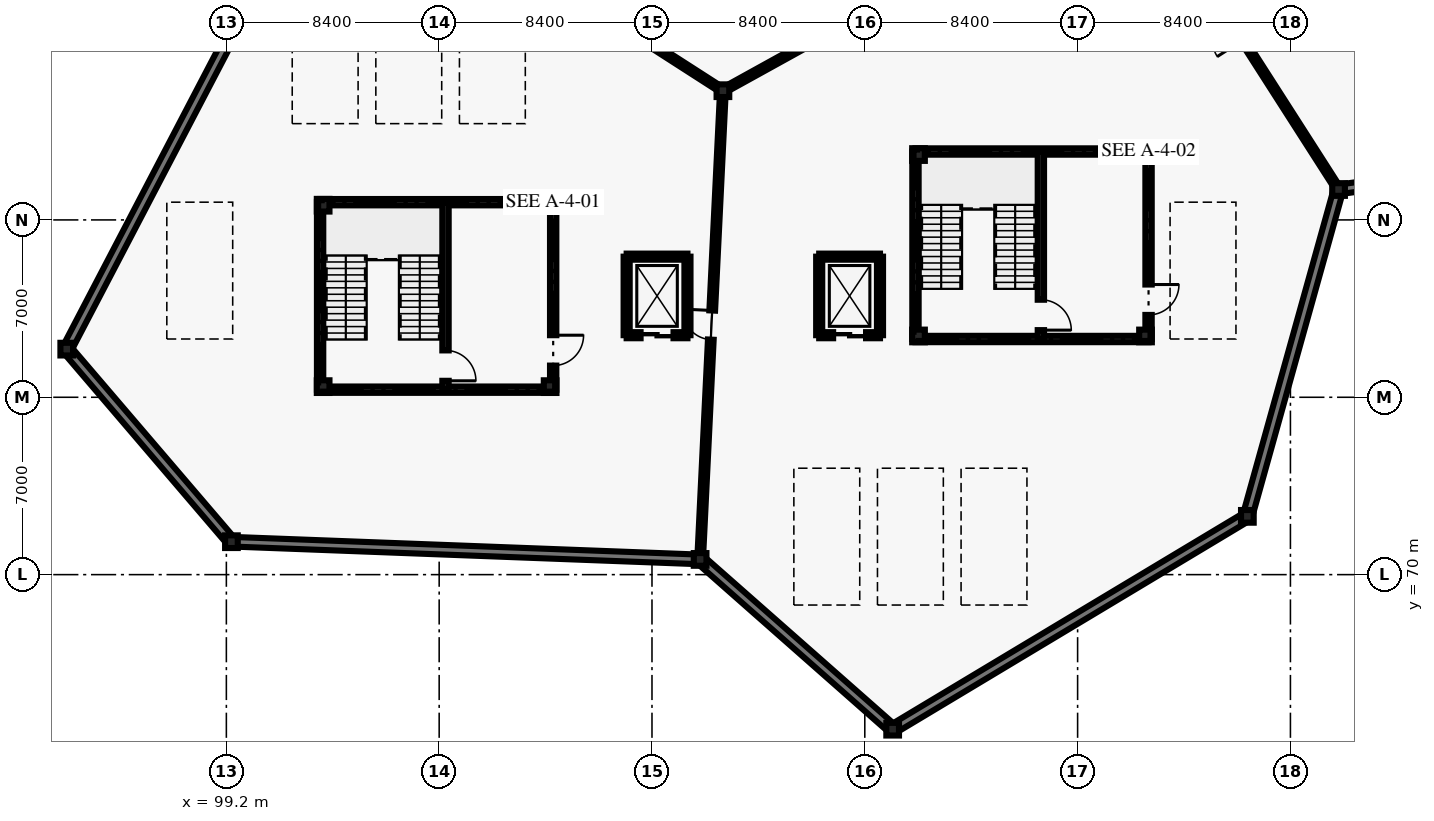
"""IFC4 building model, lengths in metres.
Left out: names, types, materials, properties, quantities, classifications, styles, units other than length and angle.
Written with IfcOpenShell. Run it as: python <this file> out.ifc"""

import sys

from ifc_helpers import new_model, si_unit, direction, frame, frame_2d, origin, origin_2d, place, context, subcontext, project, spatial, rectangle, i_section, extrude, element, fill, save


model = new_model("IFC4")
c1 = context("Model", 3, precision=1e-05, world=origin(), true_north=direction((0.0, 1.0)))
c2 = subcontext(c1, "Body", "Model", "MODEL_VIEW")
j1 = project(units=[si_unit("LENGTHUNIT", "METRE"), si_unit("PLANEANGLEUNIT", "RADIAN")], contexts=[c1])
p1 = place(None, origin())
s1 = spatial("IfcSite", under=j1, at=p1, CompositionType="ELEMENT")
p2 = place(p1, origin())
s2 = spatial("IfcBuilding", under=s1, at=p2, CompositionType="ELEMENT")
p3 = place(p2, frame((0.0, 0.0, -4.5)))
s3 = spatial("IfcBuildingStorey", under=s2, at=p3, CompositionType="ELEMENT", Elevation=-4.5)
for number, where, z_axis, x_axis in (
    (1, (92.9, 78.9, 0.0), (0.0, 0.0, 1.0), (1.0, 0.0, 0.0)),
    (2, (99.4, 71.3, 0.0), (0.0, 0.0, 1.0), (1.0, 0.0, 0.0)),
    (3, (117.9, 70.6, 0.0), (0.0, 0.0, 1.0), (1.0, 0.0, 0.0)),
    (4, (118.8, 89.1, 0.0), (0.0, 0.0, 1.0), (1.0, 0.0, 0.0)),
    (5, (125.5, 63.9, 0.0), (0.0, 0.0, 1.0), (1.0, 0.0, 0.0)),
    (6, (139.5, 72.3, 0.0), (0.0, 0.0, 1.0), (1.0, 0.0, 0.0)),
    (7, (143.1, 85.2, 0.0), (0.0, 0.0, 1.0), (1.0, 0.0, 0.0)),
    (8, (103.02, 77.42, 0.0), (0.0, 0.0, 1.0), (1.0, 0.0, 0.0)),
    (9, (111.98, 77.42, 0.0), (0.0, 0.0, 1.0), (1.0, 0.0, 0.0)),
    (10, (111.98, 84.58, 0.0), (0.0, 0.0, 1.0), (1.0, 0.0, 0.0)),
    (11, (103.02, 84.58, 0.0), (0.0, 0.0, 1.0), (1.0, 0.0, 0.0)),
    (12, (126.52, 79.42, 0.0), (0.0, 0.0, 1.0), (1.0, 0.0, 0.0)),
    (13, (135.48, 79.42, 0.0), (0.0, 0.0, 1.0), (1.0, 0.0, 0.0)),
    (14, (135.48, 86.58, 0.0), (0.0, 0.0, 1.0), (1.0, 0.0, 0.0)),
    (15, (126.52, 86.58, 0.0), (0.0, 0.0, 1.0), (1.0, 0.0, 0.0)),
):
    element("IfcColumn", number, at=place(p3, frame(where, z_axis=z_axis, x_axis=x_axis)), inside=s3, PredefinedType="COLUMN", context=c2, shape_type="SweptSolid", body=[
        extrude(i_section(OverallWidth=0.5, OverallDepth=0.5, WebThickness=0.022, FlangeThickness=0.036, at=origin_2d()), origin(), (0.0, 0.0, 1.0), 4.5),
    ])
p4 = place(p3, frame((99.4, 71.3, 0.0), z_axis=(0.0, 0.0, 1.0), x_axis=(0.999285157096, -0.037804428414, 0.0)))
e16 = element("IfcWall", 16, at=p4, inside=s3, PredefinedType="USERDEFINED", context=c2, shape_type="SweptSolid", body=[
    extrude(rectangle(XDim=18.463, YDim=0.38, at=frame_2d((9.232, 0.0))), origin(), (0.0, 0.0, 1.0), 4.14),
])
p5 = place(p3, frame((103.377, 98.956, 0.0), z_axis=(0.0, 0.0, 1.0), x_axis=(-0.463016536886, -0.886349641264, 0.0)))
e17 = element("IfcWall", 17, at=p5, inside=s3, PredefinedType="USERDEFINED", context=c2, shape_type="SweptSolid", body=[
    extrude(rectangle(XDim=22.628, YDim=0.38, at=frame_2d((11.314, 0.0))), origin(), (0.0, 0.0, 1.0), 4.14),
])
p6 = place(p3, frame((92.9, 78.9, 0.0), z_axis=(0.0, 0.0, 1.0), x_axis=(0.649974737731, -0.75995581471, 0.0)))
e18 = element("IfcWall", 18, at=p6, inside=s3, PredefinedType="USERDEFINED", context=c2, shape_type="SweptSolid", body=[
    extrude(rectangle(XDim=10.0, YDim=0.38, at=frame_2d((5.0, 0.0))), origin(), (0.0, 0.0, 1.0), 4.14),
])
p7 = place(p3, frame((117.937, 70.567, 0.0), z_axis=(0.0, 0.0, 1.0), x_axis=(0.750144471717, -0.661273976165, 0.0)))
e19 = element("IfcWall", 19, at=p7, inside=s3, PredefinedType="USERDEFINED", context=c2, shape_type="SweptSolid", body=[
    extrude(rectangle(XDim=10.082, YDim=0.38, at=frame_2d((5.041, 0.0))), origin(), (0.0, 0.0, 1.0), 4.14),
])
p8 = place(p3, frame((125.5, 63.9, 0.0), z_axis=(0.0, 0.0, 1.0), x_axis=(0.857488967429, 0.51450235251, 0.0)))
e20 = element("IfcWall", 20, at=p8, inside=s3, PredefinedType="USERDEFINED", context=c2, shape_type="SweptSolid", body=[
    extrude(rectangle(XDim=16.327, YDim=0.38, at=frame_2d((8.163, 0.0))), origin(), (0.0, 0.0, 1.0), 4.14),
])
p9 = place(p3, frame((139.5, 72.3, 0.0), z_axis=(0.0, 0.0, 1.0), x_axis=(0.268819495644, 0.963190572401, 0.0)))
e21 = element("IfcWall", 21, at=p9, inside=s3, PredefinedType="USERDEFINED", context=c2, shape_type="SweptSolid", body=[
    extrude(rectangle(XDim=13.343, YDim=0.38, at=frame_2d((6.672, 0.0))), origin(), (0.0, 0.0, 1.0), 4.14),
])
p10 = place(p3, frame((143.149, 85.207, 0.0), z_axis=(0.0, 0.0, 1.0), x_axis=(0.99005482485, 0.140682066347, 0.0)))
e22 = element("IfcWall", 22, at=p10, inside=s3, PredefinedType="USERDEFINED", context=c2, shape_type="SweptSolid", body=[
    extrude(rectangle(XDim=19.142, YDim=0.38, at=frame_2d((9.571, 0.0))), origin(), (0.0, 0.0, 1.0), 4.14),
])
p11 = place(p3, frame((117.9, 70.6, 0.0), z_axis=(0.0, 0.0, 1.0), x_axis=(0.048599072515, 0.998818366947, 0.0)))
e23 = element("IfcWall", 23, at=p11, inside=s3, PredefinedType="SOLIDWALL", context=c2, shape_type="SweptSolid", body=[
    extrude(rectangle(XDim=18.522, YDim=0.225, at=frame_2d((9.261, 0.0))), origin(), (0.0, 0.0, 1.0), 4.14),
])
p12 = place(p11, frame((8.686, 0.0, 0.0)))
e24 = element("IfcOpeningElement", 24, at=p12, cuts=e23, PredefinedType="OPENING", context=c2, shape_type="SweptSolid", body=[
    extrude(rectangle(XDim=1.15, YDim=2.2, at=frame_2d((0.575, 1.1))), frame((0.0, 0.123, 0.0), z_axis=(0.0, -1.0, 0.0), x_axis=(1.0, 0.0, 0.0)), (0.0, 0.0, 1.0), 0.245),
])
p13 = place(p3, frame((118.8, 89.1, 0.0), z_axis=(0.0, 0.0, 1.0), x_axis=(-0.841183241423, 0.540750177392, 0.0)))
e25 = element("IfcWall", 25, at=p13, inside=s3, PredefinedType="SOLIDWALL", context=c2, shape_type="SweptSolid", body=[
    extrude(rectangle(XDim=18.308, YDim=0.225, at=frame_2d((9.154, 0.0))), origin(), (0.0, 0.0, 1.0), 4.14),
])
p14 = place(p13, frame((8.554, 0.0, 0.0)))
e26 = element("IfcOpeningElement", 26, at=p14, cuts=e25, PredefinedType="OPENING", context=c2, shape_type="SweptSolid", body=[
    extrude(rectangle(XDim=1.2, YDim=2.2, at=frame_2d((0.6, 1.1))), frame((0.0, 0.123, 0.0), z_axis=(0.0, -1.0, 0.0), x_axis=(1.0, 0.0, 0.0)), (0.0, 0.0, 1.0), 0.245),
])
p15 = place(p3, frame((134.9, 98.0, 0.0), z_axis=(0.0, 0.0, 1.0), x_axis=(-0.875181353329, -0.483794996652, 0.0)))
e27 = element("IfcWall", 27, at=p15, inside=s3, PredefinedType="SOLIDWALL", context=c2, shape_type="SweptSolid", body=[
    extrude(rectangle(XDim=18.396, YDim=0.225, at=frame_2d((9.198, 0.0))), origin(), (0.0, 0.0, 1.0), 4.14),
])
p16 = place(p15, frame((8.623, 0.0, 0.0)))
e28 = element("IfcOpeningElement", 28, at=p16, cuts=e27, PredefinedType="OPENING", context=c2, shape_type="SweptSolid", body=[
    extrude(rectangle(XDim=1.15, YDim=2.2, at=frame_2d((0.575, 1.1))), frame((0.0, 0.123, 0.0), z_axis=(0.0, -1.0, 0.0), x_axis=(1.0, 0.0, 0.0)), (0.0, 0.0, 1.0), 0.245),
])
p17 = place(p3, frame((143.1, 85.2, 0.0), z_axis=(0.0, 0.0, 1.0), x_axis=(-0.539434641352, 0.842027474439, 0.0)))
e29 = element("IfcWall", 29, at=p17, inside=s3, PredefinedType="SOLIDWALL", context=c2, shape_type="SweptSolid", body=[
    extrude(rectangle(XDim=15.201, YDim=0.225, at=frame_2d((7.601, 0.0))), origin(), (0.0, 0.0, 1.0), 4.14),
])
p18 = place(p17, frame((7.001, 0.0, 0.0)))
e30 = element("IfcOpeningElement", 30, at=p18, cuts=e29, PredefinedType="OPENING", context=c2, shape_type="SweptSolid", body=[
    extrude(rectangle(XDim=1.2, YDim=2.2, at=frame_2d((0.6, 1.1))), frame((0.0, 0.123, 0.0), z_axis=(0.0, -1.0, 0.0), x_axis=(1.0, 0.0, 0.0)), (0.0, 0.0, 1.0), 0.245),
])
p19 = place(p3, frame((102.9, 77.3, 0.0), z_axis=(0.0, 0.0, 1.0), x_axis=(0.0, 1.0, 0.0)))
e31 = element("IfcWall", 31, at=p19, inside=s3, PredefinedType="SHEAR", context=c2, shape_type="SweptSolid", body=[
    extrude(rectangle(XDim=7.4, YDim=0.25, at=frame_2d((3.7, 0.0))), origin(), (0.0, 0.0, 1.0), 4.14),
])
for number, where, z_axis, x_axis in (
    (32, (102.9, 84.7, 0.0), (0.0, 0.0, 1.0), (1.0, 0.0, 0.0)),
    (33, (112.1, 77.3, 0.0), (0.0, 0.0, 1.0), (-1.0, 0.0, 0.0)),
):
    element("IfcWall", number, at=place(p3, frame(where, z_axis=z_axis, x_axis=x_axis)), inside=s3, PredefinedType="SHEAR", context=c2, shape_type="SweptSolid", body=[
        extrude(rectangle(XDim=9.2, YDim=0.25, at=frame_2d((4.6, 0.0))), origin(), (0.0, 0.0, 1.0), 4.14),
    ])
p20 = place(p3, frame((112.1, 84.7, 0.0), z_axis=(0.0, 0.0, 1.0), x_axis=(0.0, -1.0, 0.0)))
e34 = element("IfcWall", 34, at=p20, inside=s3, PredefinedType="SHEAR", context=c2, shape_type="SweptSolid", body=[
    extrude(rectangle(XDim=7.4, YDim=0.25, at=frame_2d((3.7, 0.0))), origin(), (0.0, 0.0, 1.0), 4.14),
])
p21 = place(p20, frame((5.25, 0.0, 0.0)))
e35 = element("IfcOpeningElement", 35, at=p21, cuts=e34, PredefinedType="OPENING", context=c2, shape_type="SweptSolid", body=[
    extrude(rectangle(XDim=1.2, YDim=2.2, at=frame_2d((0.6, 1.1))), frame((0.0, 0.135, 0.0), z_axis=(0.0, -1.0, 0.0), x_axis=(1.0, 0.0, 0.0)), (0.0, 0.0, 1.0), 0.27),
])
p22 = place(p3, frame((107.85, 84.7, 0.0), z_axis=(0.0, 0.0, 1.0), x_axis=(0.0, -1.0, 0.0)))
e36 = element("IfcWall", 36, at=p22, inside=s3, PredefinedType="SHEAR", context=c2, shape_type="SweptSolid", body=[
    extrude(rectangle(XDim=7.4, YDim=0.25, at=frame_2d((3.7, 0.0))), origin(), (0.0, 0.0, 1.0), 4.14),
])
p23 = place(p22, frame((5.85, 0.0, 0.0)))
e37 = element("IfcOpeningElement", 37, at=p23, cuts=e36, PredefinedType="OPENING", context=c2, shape_type="SweptSolid", body=[
    extrude(rectangle(XDim=1.2, YDim=2.2, at=frame_2d((0.6, 1.1))), frame((0.0, 0.135, 0.0), z_axis=(0.0, -1.0, 0.0), x_axis=(1.0, 0.0, 0.0)), (0.0, 0.0, 1.0), 0.27),
])
p24 = place(p3, frame((126.4, 79.3, 0.0), z_axis=(0.0, 0.0, 1.0), x_axis=(0.0, 1.0, 0.0)))
e38 = element("IfcWall", 38, at=p24, inside=s3, PredefinedType="SHEAR", context=c2, shape_type="SweptSolid", body=[
    extrude(rectangle(XDim=7.4, YDim=0.25, at=frame_2d((3.7, 0.0))), origin(), (0.0, 0.0, 1.0), 4.14),
])
for number, where, z_axis, x_axis in (
    (39, (126.4, 86.7, 0.0), (0.0, 0.0, 1.0), (1.0, 0.0, 0.0)),
    (40, (135.6, 79.3, 0.0), (0.0, 0.0, 1.0), (-1.0, 0.0, 0.0)),
):
    element("IfcWall", number, at=place(p3, frame(where, z_axis=z_axis, x_axis=x_axis)), inside=s3, PredefinedType="SHEAR", context=c2, shape_type="SweptSolid", body=[
        extrude(rectangle(XDim=9.2, YDim=0.25, at=frame_2d((4.6, 0.0))), origin(), (0.0, 0.0, 1.0), 4.14),
    ])
p25 = place(p3, frame((135.6, 86.7, 0.0), z_axis=(0.0, 0.0, 1.0), x_axis=(0.0, -1.0, 0.0)))
e41 = element("IfcWall", 41, at=p25, inside=s3, PredefinedType="SHEAR", context=c2, shape_type="SweptSolid", body=[
    extrude(rectangle(XDim=7.4, YDim=0.25, at=frame_2d((3.7, 0.0))), origin(), (0.0, 0.0, 1.0), 4.14),
])
p26 = place(p25, frame((5.25, 0.0, 0.0)))
e42 = element("IfcOpeningElement", 42, at=p26, cuts=e41, PredefinedType="OPENING", context=c2, shape_type="SweptSolid", body=[
    extrude(rectangle(XDim=1.2, YDim=2.2, at=frame_2d((0.6, 1.1))), frame((0.0, 0.135, 0.0), z_axis=(0.0, -1.0, 0.0), x_axis=(1.0, 0.0, 0.0)), (0.0, 0.0, 1.0), 0.27),
])
p27 = place(p3, frame((131.35, 86.7, 0.0), z_axis=(0.0, 0.0, 1.0), x_axis=(0.0, -1.0, 0.0)))
e43 = element("IfcWall", 43, at=p27, inside=s3, PredefinedType="SHEAR", context=c2, shape_type="SweptSolid", body=[
    extrude(rectangle(XDim=7.4, YDim=0.25, at=frame_2d((3.7, 0.0))), origin(), (0.0, 0.0, 1.0), 4.14),
])
p28 = place(p27, frame((5.85, 0.0, 0.0)))
e44 = element("IfcOpeningElement", 44, at=p28, cuts=e43, PredefinedType="OPENING", context=c2, shape_type="SweptSolid", body=[
    extrude(rectangle(XDim=1.2, YDim=2.2, at=frame_2d((0.6, 1.1))), frame((0.0, 0.135, 0.0), z_axis=(0.0, -1.0, 0.0), x_axis=(1.0, 0.0, 0.0)), (0.0, 0.0, 1.0), 0.27),
])
p29 = place(p3, frame((115.0, 82.55, 0.0), z_axis=(0.0, 0.0, 1.0), x_axis=(1.0, 0.0, 0.0)))
e45 = element("IfcWall", 45, at=p29, inside=s3, PredefinedType="SHEAR", context=c2, shape_type="SweptSolid", body=[
    extrude(rectangle(XDim=2.4, YDim=0.24, at=frame_2d((1.2, 0.0))), origin(), (0.0, 0.0, 1.0), 4.26),
])
for number, where, z_axis, x_axis in (
    (46, (117.4, 82.55, 0.0), (0.0, 0.0, 1.0), (0.0, -1.0, 0.0)),
    (47, (115.0, 79.45, 0.0), (0.0, 0.0, 1.0), (0.0, 1.0, 0.0)),
):
    element("IfcWall", number, at=place(p3, frame(where, z_axis=z_axis, x_axis=x_axis)), inside=s3, PredefinedType="SHEAR", context=c2, shape_type="SweptSolid", body=[
        extrude(rectangle(XDim=3.1, YDim=0.24, at=frame_2d((1.55, 0.0))), origin(), (0.0, 0.0, 1.0), 4.26),
    ])
p30 = place(p3, frame((117.4, 79.45, 0.0), z_axis=(0.0, 0.0, 1.0), x_axis=(-1.0, 0.0, 0.0)))
e48 = element("IfcWall", 48, at=p30, inside=s3, PredefinedType="SHEAR", context=c2, shape_type="SweptSolid", body=[
    extrude(rectangle(XDim=2.4, YDim=0.24, at=frame_2d((1.2, 0.0))), origin(), (0.0, 0.0, 1.0), 4.26),
])
p31 = place(p30, frame((0.55, 0.0, 0.0)))
e49 = element("IfcOpeningElement", 49, at=p31, cuts=e48, PredefinedType="OPENING", context=c2, shape_type="SweptSolid", body=[
    extrude(rectangle(XDim=1.3, YDim=2.25, at=frame_2d((0.65, 1.125))), frame((0.0, 0.13, 0.0), z_axis=(0.0, -1.0, 0.0), x_axis=(1.0, 0.0, 0.0)), (0.0, 0.0, 1.0), 0.26),
])
p32 = place(p3, frame((122.6, 82.55, 0.0), z_axis=(0.0, 0.0, 1.0), x_axis=(1.0, 0.0, 0.0)))
e50 = element("IfcWall", 50, at=p32, inside=s3, PredefinedType="SHEAR", context=c2, shape_type="SweptSolid", body=[
    extrude(rectangle(XDim=2.4, YDim=0.24, at=frame_2d((1.2, 0.0))), origin(), (0.0, 0.0, 1.0), 4.26),
])
for number, where, z_axis, x_axis in (
    (51, (125.0, 82.55, 0.0), (0.0, 0.0, 1.0), (0.0, -1.0, 0.0)),
    (52, (122.6, 79.45, 0.0), (0.0, 0.0, 1.0), (0.0, 1.0, 0.0)),
):
    element("IfcWall", number, at=place(p3, frame(where, z_axis=z_axis, x_axis=x_axis)), inside=s3, PredefinedType="SHEAR", context=c2, shape_type="SweptSolid", body=[
        extrude(rectangle(XDim=3.1, YDim=0.24, at=frame_2d((1.55, 0.0))), origin(), (0.0, 0.0, 1.0), 4.26),
    ])
p33 = place(p3, frame((125.0, 79.45, 0.0), z_axis=(0.0, 0.0, 1.0), x_axis=(-1.0, 0.0, 0.0)))
e53 = element("IfcWall", 53, at=p33, inside=s3, PredefinedType="SHEAR", context=c2, shape_type="SweptSolid", body=[
    extrude(rectangle(XDim=2.4, YDim=0.24, at=frame_2d((1.2, 0.0))), origin(), (0.0, 0.0, 1.0), 4.26),
])
p34 = place(p33, frame((0.55, 0.0, 0.0)))
e54 = element("IfcOpeningElement", 54, at=p34, cuts=e53, PredefinedType="OPENING", context=c2, shape_type="SweptSolid", body=[
    extrude(rectangle(XDim=1.3, YDim=2.25, at=frame_2d((0.65, 1.125))), frame((0.0, 0.13, 0.0), z_axis=(0.0, -1.0, 0.0), x_axis=(1.0, 0.0, 0.0)), (0.0, 0.0, 1.0), 0.26),
])
p35 = place(p12, origin())
e55 = element("IfcDoor", 55, at=p35, inside=s3, OperationType="SINGLE_SWING_RIGHT", PredefinedType="DOOR", context=c2, shape_type="SweptSolid", body=[
    extrude(rectangle(XDim=1.15, YDim=2.2, at=frame_2d((0.575, 1.1))), frame((0.0, 0.025, 0.0), z_axis=(0.0, -1.0, 0.0), x_axis=(1.0, 0.0, 0.0)), (0.0, 0.0, 1.0), 0.05),
])
fill(e24, e55)
p36 = place(p21, origin())
e56 = element("IfcDoor", 56, at=p36, inside=s3, OperationType="SINGLE_SWING_LEFT", PredefinedType="DOOR", context=c2, shape_type="SweptSolid", body=[
    extrude(rectangle(XDim=1.2, YDim=2.2, at=frame_2d((0.6, 1.1))), frame((0.0, 0.025, 0.0), z_axis=(0.0, -1.0, 0.0), x_axis=(1.0, 0.0, 0.0)), (0.0, 0.0, 1.0), 0.05),
])
fill(e35, e56)
p37 = place(p23, origin())
e57 = element("IfcDoor", 57, at=p37, inside=s3, OperationType="SINGLE_SWING_RIGHT", PredefinedType="DOOR", context=c2, shape_type="SweptSolid", body=[
    extrude(rectangle(XDim=1.2, YDim=2.2, at=frame_2d((0.6, 1.1))), frame((0.0, 0.025, 0.0), z_axis=(0.0, -1.0, 0.0), x_axis=(1.0, 0.0, 0.0)), (0.0, 0.0, 1.0), 0.05),
])
fill(e37, e57)
p38 = place(p26, origin())
e58 = element("IfcDoor", 58, at=p38, inside=s3, OperationType="SINGLE_SWING_LEFT", PredefinedType="DOOR", context=c2, shape_type="SweptSolid", body=[
    extrude(rectangle(XDim=1.2, YDim=2.2, at=frame_2d((0.6, 1.1))), frame((0.0, 0.025, 0.0), z_axis=(0.0, -1.0, 0.0), x_axis=(1.0, 0.0, 0.0)), (0.0, 0.0, 1.0), 0.05),
])
fill(e42, e58)
p39 = place(p28, origin())
e59 = element("IfcDoor", 59, at=p39, inside=s3, OperationType="SINGLE_SWING_RIGHT", PredefinedType="DOOR", context=c2, shape_type="SweptSolid", body=[
    extrude(rectangle(XDim=1.2, YDim=2.2, at=frame_2d((0.6, 1.1))), frame((0.0, 0.025, 0.0), z_axis=(0.0, -1.0, 0.0), x_axis=(1.0, 0.0, 0.0)), (0.0, 0.0, 1.0), 0.05),
])
fill(e44, e59)
p40 = place(p31, origin())
e60 = element("IfcDoor", 60, at=p40, inside=s3, OperationType="SLIDING_TO_LEFT", PredefinedType="DOOR", context=c2, shape_type="SweptSolid", body=[
    extrude(rectangle(XDim=1.3, YDim=2.25, at=frame_2d((0.65, 1.125))), frame((0.0, 0.025, 0.0), z_axis=(0.0, -1.0, 0.0), x_axis=(1.0, 0.0, 0.0)), (0.0, 0.0, 1.0), 0.05),
])
fill(e49, e60)
p41 = place(p34, origin())
e61 = element("IfcDoor", 61, at=p41, inside=s3, OperationType="SLIDING_TO_LEFT", PredefinedType="DOOR", context=c2, shape_type="SweptSolid", body=[
    extrude(rectangle(XDim=1.3, YDim=2.25, at=frame_2d((0.65, 1.125))), frame((0.0, 0.025, 0.0), z_axis=(0.0, -1.0, 0.0), x_axis=(1.0, 0.0, 0.0)), (0.0, 0.0, 1.0), 0.05),
])
fill(e54, e61)
save(model, sys.argv[1])
